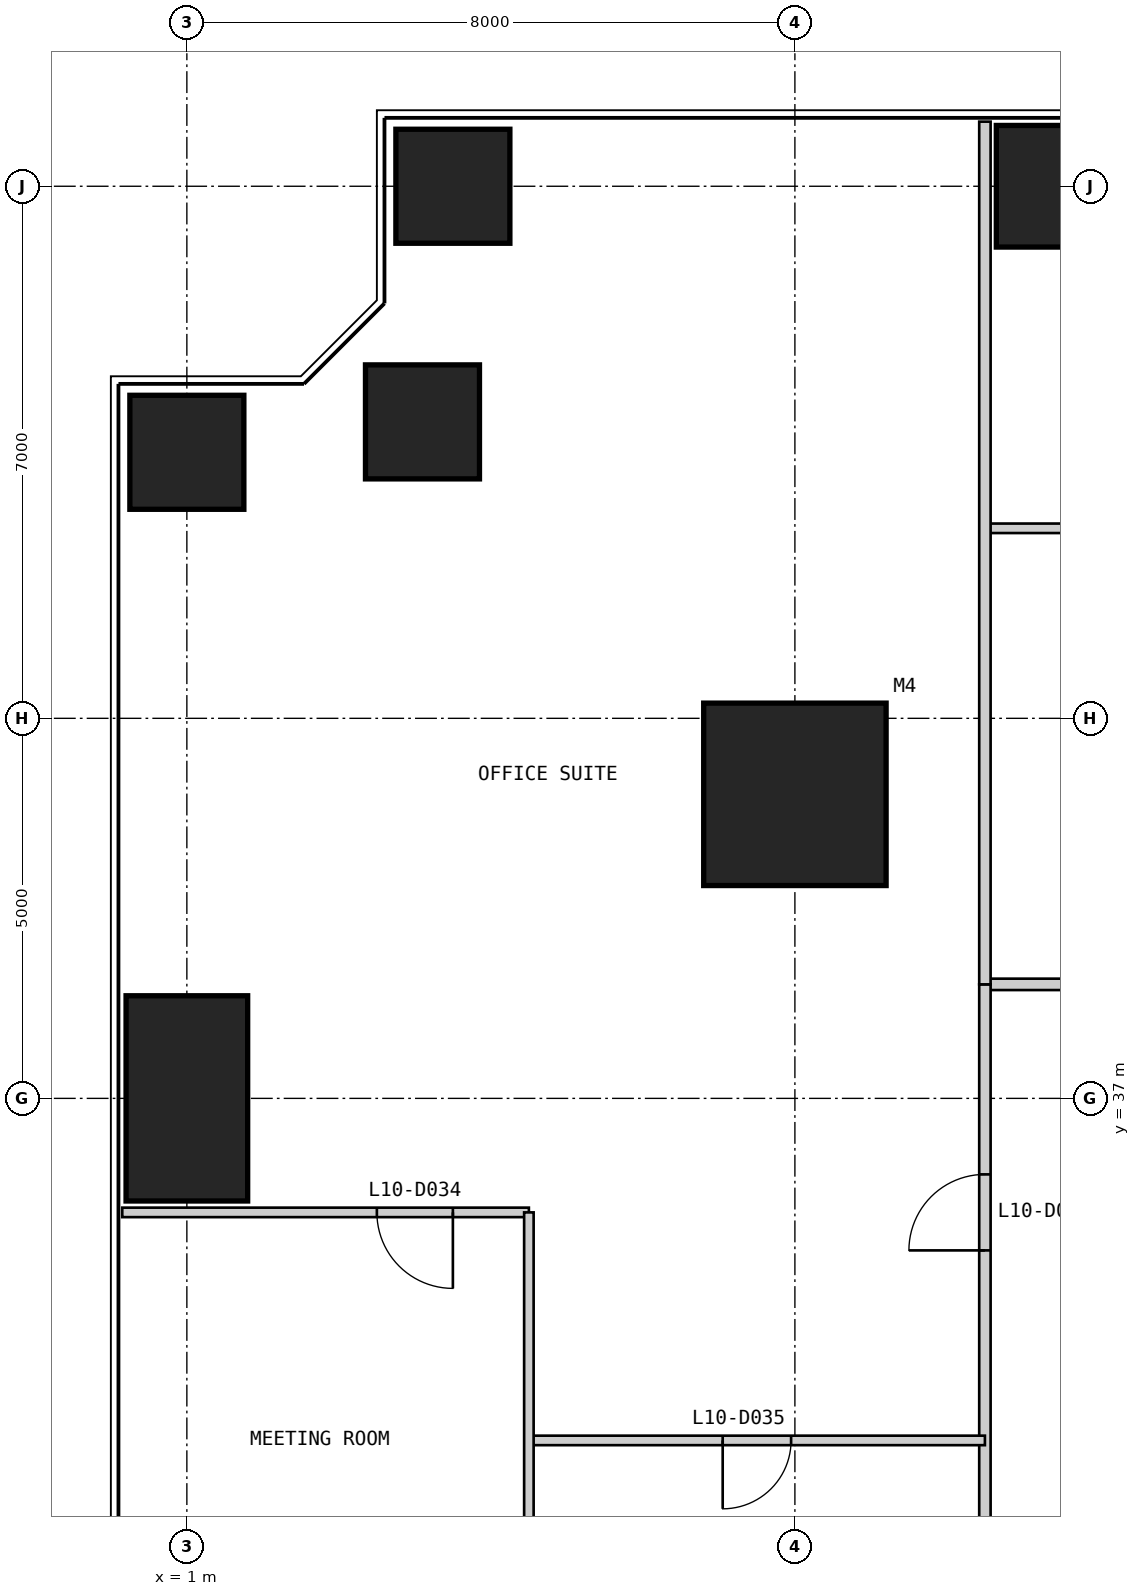
"""IFC4 building model, lengths in metres.
Left out: names, types, materials, properties, quantities, classifications, styles, units other than length and angle.
Written with IfcOpenShell. Run it as: python <this file> out.ifc"""

import sys

from ifc_helpers import new_model, si_unit, direction, frame, frame_2d, origin, origin_2d, place, context, subcontext, project, spatial, rectangle, extrude, element, fill, save


model = new_model("IFC4")
c1 = context("Model", 3, precision=1e-05, world=origin(), true_north=direction((0.0, 1.0)))
c2 = subcontext(c1, "Body", "Model", "MODEL_VIEW")
j1 = project(units=[si_unit("LENGTHUNIT", "METRE"), si_unit("PLANEANGLEUNIT", "RADIAN")], contexts=[c1])
p1 = place(None, origin())
s1 = spatial("IfcSite", under=j1, at=p1, CompositionType="ELEMENT")
p2 = place(p1, origin())
s2 = spatial("IfcBuilding", under=s1, at=p2, CompositionType="ELEMENT")
p3 = place(p2, frame((0.0, 0.0, 47.0)))
s3 = spatial("IfcBuildingStorey", under=s2, at=p3, CompositionType="ELEMENT", Elevation=47.0)
p4 = place(p3, frame((9.0, 41.0, 0.0), z_axis=(0.0, 0.0, 1.0), x_axis=(1.0, 0.0, 0.0)))
e1 = element("IfcColumn", 1, at=p4, inside=s3, PredefinedType="COLUMN", context=c2, shape_type="SweptSolid", body=[
    extrude(rectangle(XDim=2.4, YDim=2.4, at=origin_2d()), origin(), (0.0, 0.0, 1.0), 4.0),
])
p5 = place(p3, frame((13.0, 49.0, 0.0), z_axis=(0.0, 0.0, 1.0), x_axis=(1.0, 0.0, 0.0)))
e2 = element("IfcColumn", 2, at=p5, inside=s3, PredefinedType="COLUMN", context=c2, shape_type="SweptSolid", body=[
    extrude(rectangle(XDim=2.7, YDim=1.6, at=origin_2d()), origin(), (0.0, 0.0, 1.0), 4.0),
])
for number, where, z_axis, x_axis in (
    (3, (4.5, 49.0, 0.0), (0.0, 0.0, 1.0), (1.0, 0.0, 0.0)),
    (4, (4.1, 45.9, 0.0), (0.0, 0.0, 1.0), (1.0, 0.0, 0.0)),
    (5, (1.0, 45.5, 0.0), (0.0, 0.0, 1.0), (1.0, 0.0, 0.0)),
):
    element("IfcColumn", number, at=place(p3, frame(where, z_axis=z_axis, x_axis=x_axis)), inside=s3, PredefinedType="COLUMN", context=c2, shape_type="SweptSolid", body=[
        extrude(rectangle(XDim=1.5, YDim=1.5, at=origin_2d()), origin(), (0.0, 0.0, 1.0), 4.0),
    ])
p6 = place(p3, frame((1.0, 37.0, 0.0), z_axis=(0.0, 0.0, 1.0), x_axis=(1.0, 0.0, 0.0)))
e6 = element("IfcColumn", 6, at=p6, inside=s3, PredefinedType="COLUMN", context=c2, shape_type="SweptSolid", body=[
    extrude(rectangle(XDim=1.6, YDim=2.7, at=origin_2d()), origin(), (0.0, 0.0, 1.0), 4.0),
])
p7 = place(p3, frame((38.5, 38.5, 0.0), z_axis=(0.0, 0.0, 1.0), x_axis=(-1.0, 0.0, 0.0)))
e7 = element("IfcWall", 7, at=p7, inside=s3, PredefinedType="PARTITIONING", context=c2, shape_type="SweptSolid", body=[
    extrude(rectangle(XDim=27.0, YDim=0.15, at=frame_2d((13.5, 0.0))), origin(), (0.0, 0.0, 1.0), 3.85),
])
p8 = place(p7, frame((2.5, 0.0, 0.0)))
e8 = element("IfcOpeningElement", 8, at=p8, cuts=e7, PredefinedType="OPENING", context=c2, shape_type="SweptSolid", body=[
    extrude(rectangle(XDim=1.0, YDim=2.2, at=frame_2d((0.5, 1.1))), frame((0.0, 0.085, 0.0), z_axis=(0.0, -1.0, 0.0), x_axis=(1.0, 0.0, 0.0)), (0.0, 0.0, 1.0), 0.17),
])
p9 = place(p7, frame((16.0, 0.0, 0.0)))
e9 = element("IfcOpeningElement", 9, at=p9, cuts=e7, PredefinedType="OPENING", context=c2, shape_type="SweptSolid", body=[
    extrude(rectangle(XDim=1.0, YDim=2.2, at=frame_2d((0.5, 1.1))), frame((0.0, 0.085, 0.0), z_axis=(0.0, -1.0, 0.0), x_axis=(1.0, 0.0, 0.0)), (0.0, 0.0, 1.0), 0.17),
])
p10 = place(p3, frame((17.5, 44.5, 0.0), z_axis=(0.0, 0.0, 1.0), x_axis=(-1.0, 0.0, 0.0)))
e10 = element("IfcWall", 10, at=p10, inside=s3, PredefinedType="PARTITIONING", context=c2, shape_type="SweptSolid", body=[
    extrude(rectangle(XDim=6.0, YDim=0.125, at=frame_2d((3.0, 0.0))), origin(), (0.0, 0.0, 1.0), 3.85),
])
p11 = place(p3, frame((11.5, 38.5, 0.0), z_axis=(0.0, 0.0, 1.0), x_axis=(0.0, -1.0, 0.0)))
e11 = element("IfcWall", 11, at=p11, inside=s3, PredefinedType="PARTITIONING", context=c2, shape_type="SweptSolid", body=[
    extrude(rectangle(XDim=27.0, YDim=0.15, at=frame_2d((13.5, 0.0))), origin(), (0.0, 0.0, 1.0), 3.85),
])
p12 = place(p11, frame((2.5, 0.0, 0.0)))
e12 = element("IfcOpeningElement", 12, at=p12, cuts=e11, PredefinedType="OPENING", context=c2, shape_type="SweptSolid", body=[
    extrude(rectangle(XDim=1.0, YDim=2.2, at=frame_2d((0.5, 1.1))), frame((0.0, 0.085, 0.0), z_axis=(0.0, -1.0, 0.0), x_axis=(1.0, 0.0, 0.0)), (0.0, 0.0, 1.0), 0.17),
])
p13 = place(p11, frame((13.0, 0.0, 0.0)))
e13 = element("IfcOpeningElement", 13, at=p13, cuts=e11, PredefinedType="OPENING", context=c2, shape_type="SweptSolid", body=[
    extrude(rectangle(XDim=1.0, YDim=2.2, at=frame_2d((0.5, 1.1))), frame((0.0, 0.085, 0.0), z_axis=(0.0, -1.0, 0.0), x_axis=(1.0, 0.0, 0.0)), (0.0, 0.0, 1.0), 0.17),
])
p14 = place(p11, frame((23.5, 0.0, 0.0)))
e14 = element("IfcOpeningElement", 14, at=p14, cuts=e11, PredefinedType="OPENING", context=c2, shape_type="SweptSolid", body=[
    extrude(rectangle(XDim=1.0, YDim=2.2, at=frame_2d((0.5, 1.1))), frame((0.0, 0.085, 0.0), z_axis=(0.0, -1.0, 0.0), x_axis=(1.0, 0.0, 0.0)), (0.0, 0.0, 1.0), 0.17),
])
p15 = place(p3, frame((11.5, 49.85, 0.0), z_axis=(0.0, 0.0, 1.0), x_axis=(0.0, -1.0, 0.0)))
e15 = element("IfcWall", 15, at=p15, inside=s3, PredefinedType="PARTITIONING", context=c2, shape_type="SweptSolid", body=[
    extrude(rectangle(XDim=11.35, YDim=0.15, at=frame_2d((5.675, 0.0))), origin(), (0.0, 0.0, 1.0), 3.85),
])
p16 = place(p3, frame((0.15, 35.5, 0.0), z_axis=(0.0, 0.0, 1.0), x_axis=(1.0, 0.0, 0.0)))
e16 = element("IfcWall", 16, at=p16, inside=s3, PredefinedType="PARTITIONING", context=c2, shape_type="SweptSolid", body=[
    extrude(rectangle(XDim=5.35, YDim=0.125, at=frame_2d((2.675, 0.0))), origin(), (0.0, 0.0, 1.0), 3.85),
])
p17 = place(p16, frame((3.35, 0.0, 0.0)))
e17 = element("IfcOpeningElement", 17, at=p17, cuts=e16, PredefinedType="OPENING", context=c2, shape_type="SweptSolid", body=[
    extrude(rectangle(XDim=1.0, YDim=2.2, at=frame_2d((0.5, 1.1))), frame((0.0, 0.073, 0.0), z_axis=(0.0, -1.0, 0.0), x_axis=(1.0, 0.0, 0.0)), (0.0, 0.0, 1.0), 0.145),
])
p18 = place(p3, frame((5.5, 32.5, 0.0), z_axis=(0.0, 0.0, 1.0), x_axis=(1.0, 0.0, 0.0)))
e18 = element("IfcWall", 18, at=p18, inside=s3, PredefinedType="PARTITIONING", context=c2, shape_type="SweptSolid", body=[
    extrude(rectangle(XDim=6.0, YDim=0.125, at=frame_2d((3.0, 0.0))), origin(), (0.0, 0.0, 1.0), 3.85),
])
p19 = place(p18, frame((2.55, 0.0, 0.0)))
e19 = element("IfcOpeningElement", 19, at=p19, cuts=e18, PredefinedType="OPENING", context=c2, shape_type="SweptSolid", body=[
    extrude(rectangle(XDim=0.9, YDim=2.2, at=frame_2d((0.45, 1.1))), frame((0.0, 0.073, 0.0), z_axis=(0.0, -1.0, 0.0), x_axis=(1.0, 0.0, 0.0)), (0.0, 0.0, 1.0), 0.145),
])
p20 = place(p3, frame((5.5, 35.5, 0.0), z_axis=(0.0, 0.0, 1.0), x_axis=(0.0, -1.0, 0.0)))
e20 = element("IfcWall", 20, at=p20, inside=s3, PredefinedType="PARTITIONING", context=c2, shape_type="SweptSolid", body=[
    extrude(rectangle(XDim=6.0, YDim=0.125, at=frame_2d((3.0, 0.0))), origin(), (0.0, 0.0, 1.0), 3.85),
])
p21 = place(p12, frame((1.0, 0.0, 0.0), z_axis=(0.0, 0.0, 1.0), x_axis=(-1.0, 0.0, 0.0)))
e21 = element("IfcDoor", 21, at=p21, inside=s3, OperationType="SINGLE_SWING_LEFT", PredefinedType="DOOR", context=c2, shape_type="SweptSolid", body=[
    extrude(rectangle(XDim=1.0, YDim=2.2, at=frame_2d((0.5, 1.1))), frame((0.0, 0.025, 0.0), z_axis=(0.0, -1.0, 0.0), x_axis=(1.0, 0.0, 0.0)), (0.0, 0.0, 1.0), 0.05),
])
fill(e12, e21)
p22 = place(p17, frame((1.0, 0.0, 0.0), z_axis=(0.0, 0.0, 1.0), x_axis=(-1.0, 0.0, 0.0)))
e22 = element("IfcDoor", 22, at=p22, inside=s3, OperationType="SINGLE_SWING_LEFT", PredefinedType="DOOR", context=c2, shape_type="SweptSolid", body=[
    extrude(rectangle(XDim=1.0, YDim=2.2, at=frame_2d((0.5, 1.1))), frame((0.0, 0.025, 0.0), z_axis=(0.0, -1.0, 0.0), x_axis=(1.0, 0.0, 0.0)), (0.0, 0.0, 1.0), 0.05),
])
fill(e17, e22)
p23 = place(p19, frame((0.9, 0.0, 0.0), z_axis=(0.0, 0.0, 1.0), x_axis=(-1.0, 0.0, 0.0)))
e23 = element("IfcDoor", 23, at=p23, inside=s3, OperationType="SINGLE_SWING_RIGHT", PredefinedType="DOOR", context=c2, shape_type="SweptSolid", body=[
    extrude(rectangle(XDim=0.9, YDim=2.2, at=frame_2d((0.45, 1.1))), frame((0.0, 0.025, 0.0), z_axis=(0.0, -1.0, 0.0), x_axis=(1.0, 0.0, 0.0)), (0.0, 0.0, 1.0), 0.05),
])
fill(e19, e23)
save(model, sys.argv[1])
